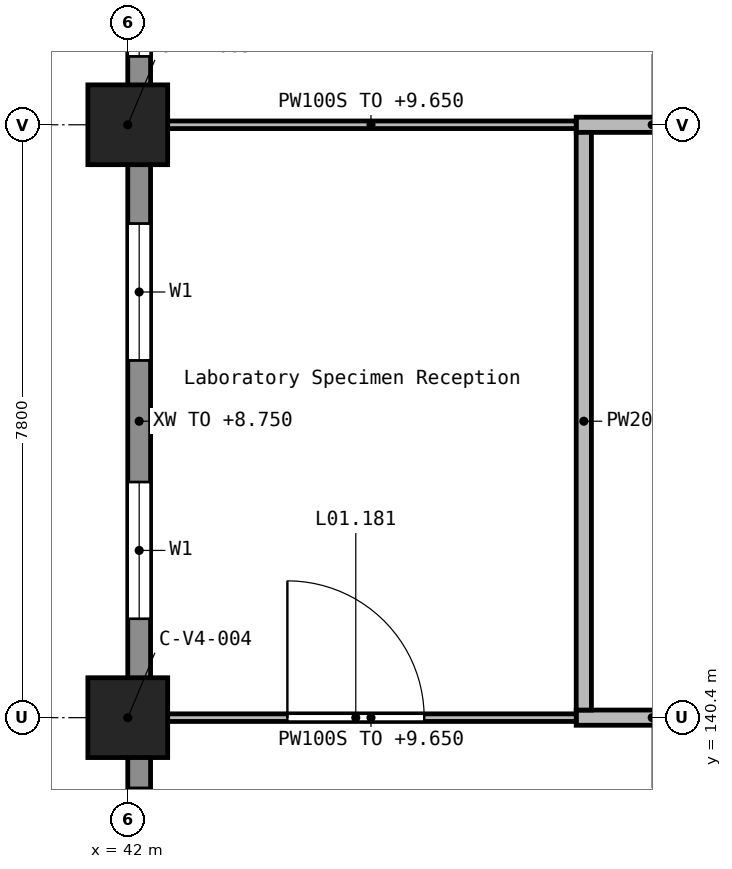
"""IFC4 building model, lengths in metres.
Left out: names, types, materials, properties, quantities, classifications, styles, units other than length and angle.
Written with IfcOpenShell. Run it as: python <this file> out.ifc"""

import sys

from ifc_helpers import new_model, si_unit, direction, frame, frame_2d, origin, origin_2d, place, context, subcontext, project, spatial, rectangle, extrude, element, fill, save


model = new_model("IFC4")
c1 = context("Model", 3, precision=1e-05, world=origin(), true_north=direction((0.0, 1.0)))
c2 = subcontext(c1, "Body", "Model", "MODEL_VIEW")
j1 = project(units=[si_unit("LENGTHUNIT", "METRE"), si_unit("PLANEANGLEUNIT", "RADIAN")], contexts=[c1])
p1 = place(None, origin())
s1 = spatial("IfcSite", under=j1, at=p1, CompositionType="ELEMENT")
p2 = place(p1, origin())
s2 = spatial("IfcBuilding", under=s1, at=p2, CompositionType="ELEMENT")
p3 = place(p2, frame((0.0, 0.0, 5.4)))
s3 = spatial("IfcBuildingStorey", under=s2, at=p3, CompositionType="ELEMENT", Elevation=5.4)
for number, where, z_axis, x_axis in (
    (1, (42.0, 140.4, 0.0), (0.0, 0.0, 1.0), (1.0, 0.0, 0.0)),
    (2, (42.0, 148.2, 0.0), (0.0, 0.0, 1.0), (1.0, 0.0, 0.0)),
):
    element("IfcColumn", number, at=place(p3, frame(where, z_axis=z_axis, x_axis=x_axis)), inside=s3, PredefinedType="COLUMN", context=c2, shape_type="SweptSolid", body=[
        extrude(rectangle(XDim=1.05, YDim=1.05, at=origin_2d()), origin(), (0.0, 0.0, 1.0), 4.5),
    ])
p4 = place(p3, frame((42.15, 151.3, 0.0), z_axis=(0.0, 0.0, 1.0), x_axis=(0.0, -1.0, 0.0)))
e3 = element("IfcWall", 3, at=p4, inside=s3, PredefinedType="STANDARD", context=c2, shape_type="SweptSolid", body=[
    extrude(rectangle(XDim=2.6, YDim=0.3, at=frame_2d((1.3, 0.0))), origin(), (0.0, 0.0, 1.0), 3.35),
])
p5 = place(p4, frame((0.4, 0.0, 0.9)))
e4 = element("IfcOpeningElement", 4, at=p5, cuts=e3, PredefinedType="OPENING", context=c2, shape_type="SweptSolid", body=[
    extrude(rectangle(XDim=1.8, YDim=1.5, at=frame_2d((0.9, 0.75))), frame((0.0, 0.16, 0.0), z_axis=(0.0, -1.0, 0.0), x_axis=(1.0, 0.0, 0.0)), (0.0, 0.0, 1.0), 0.32),
])
p6 = place(p3, frame((42.15, 147.7, 0.0), z_axis=(0.0, 0.0, 1.0), x_axis=(0.0, -1.0, 0.0)))
e5 = element("IfcWall", 5, at=p6, inside=s3, PredefinedType="STANDARD", context=c2, shape_type="SweptSolid", body=[
    extrude(rectangle(XDim=6.8, YDim=0.3, at=frame_2d((3.4, 0.0))), origin(), (0.0, 0.0, 1.0), 3.35),
])
p7 = place(p6, frame((0.8, 0.0, 0.9)))
e6 = element("IfcOpeningElement", 6, at=p7, cuts=e5, PredefinedType="OPENING", context=c2, shape_type="SweptSolid", body=[
    extrude(rectangle(XDim=1.8, YDim=1.5, at=frame_2d((0.9, 0.75))), frame((0.0, 0.16, 0.0), z_axis=(0.0, -1.0, 0.0), x_axis=(1.0, 0.0, 0.0)), (0.0, 0.0, 1.0), 0.32),
])
p8 = place(p6, frame((4.2, 0.0, 0.9)))
e7 = element("IfcOpeningElement", 7, at=p8, cuts=e5, PredefinedType="OPENING", context=c2, shape_type="SweptSolid", body=[
    extrude(rectangle(XDim=1.8, YDim=1.5, at=frame_2d((0.9, 0.75))), frame((0.0, 0.16, 0.0), z_axis=(0.0, -1.0, 0.0), x_axis=(1.0, 0.0, 0.0)), (0.0, 0.0, 1.0), 0.32),
])
p9 = place(p3, frame((42.15, 139.9, 0.0), z_axis=(0.0, 0.0, 1.0), x_axis=(0.0, -1.0, 0.0)))
e8 = element("IfcWall", 8, at=p9, inside=s3, PredefinedType="STANDARD", context=c2, shape_type="SweptSolid", body=[
    extrude(rectangle(XDim=2.65, YDim=0.3, at=frame_2d((1.325, 0.0))), origin(), (0.0, 0.0, 1.0), 3.35),
])
p10 = place(p9, frame((0.425, 0.0, 0.9)))
e9 = element("IfcOpeningElement", 9, at=p10, cuts=e8, PredefinedType="OPENING", context=c2, shape_type="SweptSolid", body=[
    extrude(rectangle(XDim=1.8, YDim=1.5, at=frame_2d((0.9, 0.75))), frame((0.0, 0.16, 0.0), z_axis=(0.0, -1.0, 0.0), x_axis=(1.0, 0.0, 0.0)), (0.0, 0.0, 1.0), 0.32),
])
for number, where, z_axis, x_axis in (
    (10, (47.9, 140.4, 0.0), (0.0, 0.0, 1.0), (1.0, 0.0, 0.0)),
    (11, (47.9, 148.2, 0.0), (0.0, 0.0, 1.0), (1.0, 0.0, 0.0)),
):
    element("IfcWall", number, at=place(p3, frame(where, z_axis=z_axis, x_axis=x_axis)), inside=s3, PredefinedType="SOLIDWALL", context=c2, shape_type="SweptSolid", body=[
        extrude(rectangle(XDim=2.0, YDim=0.2, at=frame_2d((1.0, 0.0))), origin(), (0.0, 0.0, 1.0), 4.25),
    ])
p11 = place(p3, frame((48.0, 140.5, 0.0), z_axis=(0.0, 0.0, 1.0), x_axis=(0.0, 1.0, 0.0)))
e12 = element("IfcWall", 12, at=p11, inside=s3, PredefinedType="SOLIDWALL", context=c2, shape_type="SweptSolid", body=[
    extrude(rectangle(XDim=7.6, YDim=0.2, at=frame_2d((3.8, 0.0))), origin(), (0.0, 0.0, 1.0), 4.25),
])
p12 = place(p3, frame((42.5, 140.4, 0.0), z_axis=(0.0, 0.0, 1.0), x_axis=(1.0, 0.0, 0.0)))
e13 = element("IfcWall", 13, at=p12, inside=s3, PredefinedType="PARTITIONING", context=c2, shape_type="SweptSolid", body=[
    extrude(rectangle(XDim=5.4, YDim=0.1, at=frame_2d((2.7, 0.0))), origin(), (0.0, 0.0, 1.0), 4.25),
])
p13 = place(p12, frame((1.6, 0.0, 0.0)))
e14 = element("IfcOpeningElement", 14, at=p13, cuts=e13, PredefinedType="OPENING", context=c2, shape_type="SweptSolid", body=[
    extrude(rectangle(XDim=1.8, YDim=2.1, at=frame_2d((0.9, 1.05))), frame((0.0, 0.06, 0.0), z_axis=(0.0, -1.0, 0.0), x_axis=(1.0, 0.0, 0.0)), (0.0, 0.0, 1.0), 0.12),
])
p14 = place(p3, frame((42.5, 148.2, 0.0), z_axis=(0.0, 0.0, 1.0), x_axis=(1.0, 0.0, 0.0)))
e15 = element("IfcWall", 15, at=p14, inside=s3, PredefinedType="PARTITIONING", context=c2, shape_type="SweptSolid", body=[
    extrude(rectangle(XDim=5.4, YDim=0.1, at=frame_2d((2.7, 0.0))), origin(), (0.0, 0.0, 1.0), 4.25),
])
p15 = place(p5, origin())
e16 = element("IfcWindow", 16, at=p15, inside=s3, PartitioningType="SINGLE_PANEL", PredefinedType="WINDOW", context=c2, shape_type="SweptSolid", body=[
    extrude(rectangle(XDim=1.8, YDim=1.5, at=frame_2d((0.9, 0.75))), frame((0.0, 0.03, 0.0), z_axis=(0.0, -1.0, 0.0), x_axis=(1.0, 0.0, 0.0)), (0.0, 0.0, 1.0), 0.06),
])
fill(e4, e16)
p16 = place(p7, origin())
e17 = element("IfcWindow", 17, at=p16, inside=s3, PartitioningType="SINGLE_PANEL", PredefinedType="WINDOW", context=c2, shape_type="SweptSolid", body=[
    extrude(rectangle(XDim=1.8, YDim=1.5, at=frame_2d((0.9, 0.75))), frame((0.0, 0.03, 0.0), z_axis=(0.0, -1.0, 0.0), x_axis=(1.0, 0.0, 0.0)), (0.0, 0.0, 1.0), 0.06),
])
fill(e6, e17)
p17 = place(p8, origin())
e18 = element("IfcWindow", 18, at=p17, inside=s3, PartitioningType="SINGLE_PANEL", PredefinedType="WINDOW", context=c2, shape_type="SweptSolid", body=[
    extrude(rectangle(XDim=1.8, YDim=1.5, at=frame_2d((0.9, 0.75))), frame((0.0, 0.03, 0.0), z_axis=(0.0, -1.0, 0.0), x_axis=(1.0, 0.0, 0.0)), (0.0, 0.0, 1.0), 0.06),
])
fill(e7, e18)
p18 = place(p10, origin())
e19 = element("IfcWindow", 19, at=p18, inside=s3, PartitioningType="SINGLE_PANEL", PredefinedType="WINDOW", context=c2, shape_type="SweptSolid", body=[
    extrude(rectangle(XDim=1.8, YDim=1.5, at=frame_2d((0.9, 0.75))), frame((0.0, 0.03, 0.0), z_axis=(0.0, -1.0, 0.0), x_axis=(1.0, 0.0, 0.0)), (0.0, 0.0, 1.0), 0.06),
])
fill(e9, e19)
p19 = place(p13, origin())
e20 = element("IfcDoor", 20, at=p19, inside=s3, OperationType="DOUBLE_DOOR_SINGLE_SWING", PredefinedType="DOOR", context=c2, shape_type="SweptSolid", body=[
    extrude(rectangle(XDim=1.8, YDim=2.1, at=frame_2d((0.9, 1.05))), frame((0.0, 0.025, 0.0), z_axis=(0.0, -1.0, 0.0), x_axis=(1.0, 0.0, 0.0)), (0.0, 0.0, 1.0), 0.05),
])
fill(e14, e20)
save(model, sys.argv[1])
